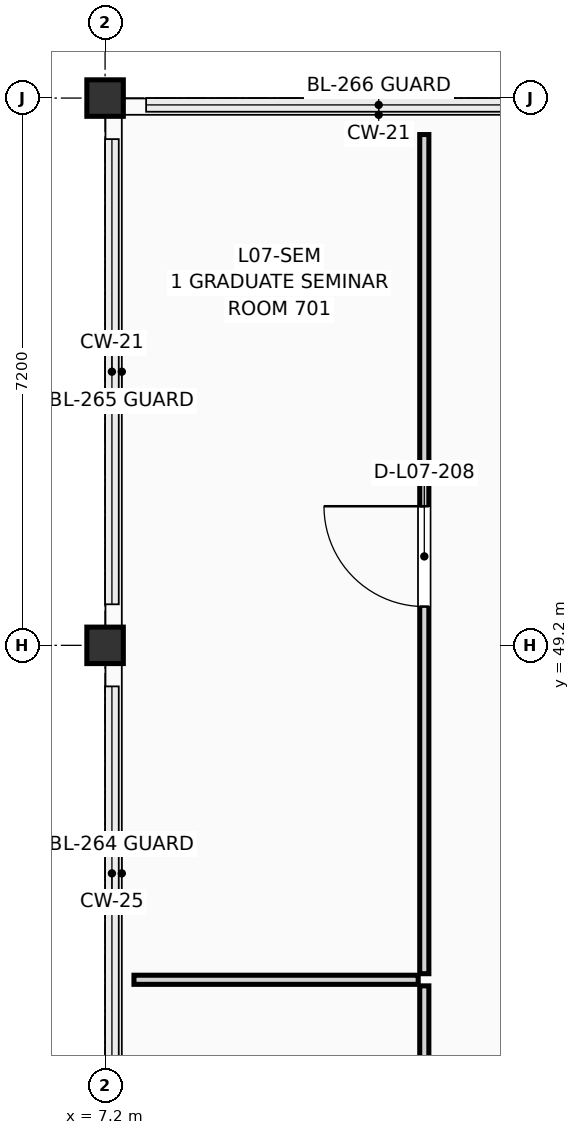
"""IFC4 building model, lengths in metres.
Left out: names, types, materials, properties, quantities, classifications, styles, units other than length and angle.
Written with IfcOpenShell. Run it as: python <this file> out.ifc"""

import sys

from ifc_helpers import new_model, si_unit, direction, frame, frame_2d, origin, origin_2d, place, context, subcontext, project, spatial, rectangle, extrude, element, fill, save


model = new_model("IFC4")
c1 = context("Model", 3, precision=1e-05, world=origin(), true_north=direction((0.0, 1.0)))
c2 = subcontext(c1, "Body", "Model", "MODEL_VIEW")
j1 = project(units=[si_unit("LENGTHUNIT", "METRE"), si_unit("PLANEANGLEUNIT", "RADIAN")], contexts=[c1])
p1 = place(None, origin())
s1 = spatial("IfcSite", under=j1, at=p1, CompositionType="ELEMENT")
p2 = place(p1, origin())
s2 = spatial("IfcBuilding", under=s1, at=p2, CompositionType="ELEMENT")
p3 = place(p2, frame((0.0, 0.0, 26.25)))
s3 = spatial("IfcBuildingStorey", under=s2, at=p3, CompositionType="ELEMENT", Elevation=26.25)
for number, where, z_axis, x_axis in (
    (1, (7.2, 49.2, 0.0), (0.0, 0.0, 1.0), (1.0, 0.0, 0.0)),
    (2, (7.2, 56.4, 0.0), (0.0, 0.0, 1.0), (1.0, 0.0, 0.0)),
):
    element("IfcColumn", number, at=place(p3, frame(where, z_axis=z_axis, x_axis=x_axis)), inside=s3, PredefinedType="COLUMN", context=c2, shape_type="SweptSolid", body=[
        extrude(rectangle(XDim=0.48, YDim=0.48, at=origin_2d()), origin(), (0.0, 0.0, 1.0), 3.45),
    ])
p4 = place(p3, frame((11.4, 33.48, 0.0), z_axis=(0.0, 0.0, 1.0), x_axis=(0.0, 1.0, 0.0)))
e3 = element("IfcWall", 3, at=p4, inside=s3, PredefinedType="PARTITIONING", context=c2, shape_type="SweptSolid", body=[
    extrude(rectangle(XDim=11.24, YDim=0.12, at=frame_2d((5.62, 0.0))), origin(), (0.0, 0.0, 1.0), 3.225),
])
p5 = place(p4, frame((4.96, 0.0, 0.0)))
e4 = element("IfcOpeningElement", 4, at=p5, cuts=e3, PredefinedType="OPENING", context=c2, shape_type="SweptSolid", body=[
    extrude(rectangle(XDim=1.32, YDim=2.2, at=frame_2d((0.66, 1.1))), frame((0.0, 0.072, 0.0), z_axis=(0.0, -1.0, 0.0), x_axis=(1.0, 0.0, 0.0)), (0.0, 0.0, 1.0), 0.144),
])
p6 = place(p3, frame((7.58, 44.8, 0.0), z_axis=(0.0, 0.0, 1.0), x_axis=(1.0, 0.0, 0.0)))
e5 = element("IfcWall", 5, at=p6, inside=s3, PredefinedType="PARTITIONING", context=c2, shape_type="SweptSolid", body=[
    extrude(rectangle(XDim=3.74, YDim=0.12, at=frame_2d((1.87, 0.0))), origin(), (0.0, 0.0, 1.0), 3.225),
])
p7 = place(p3, frame((11.4, 44.88, 0.0), z_axis=(0.0, 0.0, 1.0), x_axis=(0.0, 1.0, 0.0)))
e6 = element("IfcWall", 6, at=p7, inside=s3, PredefinedType="PARTITIONING", context=c2, shape_type="SweptSolid", body=[
    extrude(rectangle(XDim=11.04, YDim=0.12, at=frame_2d((5.52, 0.0))), origin(), (0.0, 0.0, 1.0), 3.225),
])
p8 = place(p7, frame((4.83, 0.0, 0.0)))
e7 = element("IfcOpeningElement", 7, at=p8, cuts=e6, PredefinedType="OPENING", context=c2, shape_type="SweptSolid", body=[
    extrude(rectangle(XDim=1.32, YDim=2.2, at=frame_2d((0.66, 1.1))), frame((0.0, 0.072, 0.0), z_axis=(0.0, -1.0, 0.0), x_axis=(1.0, 0.0, 0.0)), (0.0, 0.0, 1.0), 0.144),
])
p9 = place(p8, origin())
e8 = element("IfcDoor", 8, at=p9, inside=s3, OperationType="SINGLE_SWING_RIGHT", PredefinedType="DOOR", context=c2, shape_type="SweptSolid", body=[
    extrude(rectangle(XDim=1.32, YDim=2.2, at=frame_2d((0.66, 1.1))), frame((0.0, 0.025, 0.0), z_axis=(0.0, -1.0, 0.0), x_axis=(1.0, 0.0, 0.0)), (0.0, 0.0, 1.0), 0.05),
])
fill(e7, e8)
save(model, sys.argv[1])
